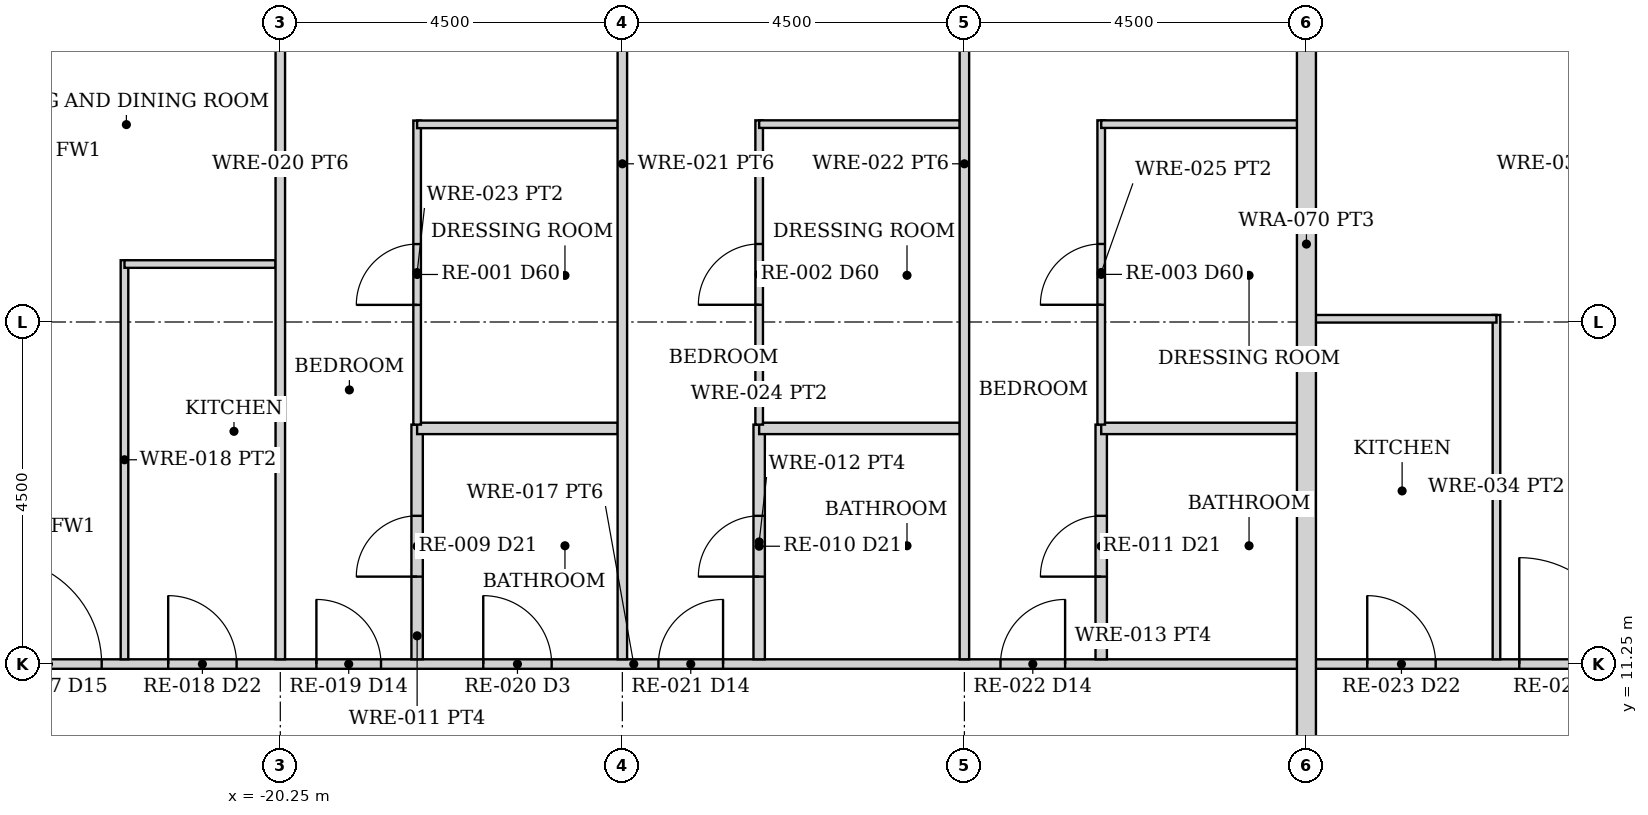
"""IFC4 building model, lengths in metres.
Left out: names, types, materials, properties, quantities, classifications, styles, units other than length and angle.
Written with IfcOpenShell. Run it as: python <this file> out.ifc"""

import sys

from ifc_helpers import new_model, si_unit, direction, frame, frame_2d, origin, place, context, subcontext, project, spatial, rectangle, extrude, element, fill, save


model = new_model("IFC4")
c1 = context("Model", 3, precision=1e-05, world=origin(), true_north=direction((0.0, 1.0)))
c2 = subcontext(c1, "Body", "Model", "MODEL_VIEW")
j1 = project(units=[si_unit("LENGTHUNIT", "METRE"), si_unit("PLANEANGLEUNIT", "RADIAN")], contexts=[c1])
p1 = place(None, origin())
s1 = spatial("IfcSite", under=j1, at=p1, CompositionType="ELEMENT")
p2 = place(p1, origin())
s2 = spatial("IfcBuilding", under=s1, at=p2, CompositionType="ELEMENT")
p3 = place(p2, frame((0.0, 0.0, 68.5)))
s3 = spatial("IfcBuildingStorey", under=s2, at=p3, CompositionType="ELEMENT", Elevation=68.5)
p4 = place(p3, frame((-24.35, 11.25, 0.0), z_axis=(0.0, 0.0, 1.0), x_axis=(1.0, 0.0, 0.0)))
e1 = element("IfcWall", 1, at=p4, inside=s3, PredefinedType="PARTITIONING", context=c2, shape_type="SweptSolid", body=[
    extrude(rectangle(XDim=17.5, YDim=0.125, at=frame_2d((8.75, 0.0))), origin(), (0.0, 0.0, 1.0), 2.373),
])
p5 = place(p4, frame((2.625, 0.0, 0.0)))
e2 = element("IfcOpeningElement", 2, at=p5, cuts=e1, PredefinedType="OPENING", context=c2, shape_type="SweptSolid", body=[
    extrude(rectangle(XDim=0.9, YDim=2.1, at=frame_2d((0.45, 1.05))), frame((0.0, 0.073, 0.0), z_axis=(0.0, -1.0, 0.0), x_axis=(1.0, 0.0, 0.0)), (0.0, 0.0, 1.0), 0.145),
])
p6 = place(p4, frame((0.35, 0.0, 0.0)))
e3 = element("IfcOpeningElement", 3, at=p6, cuts=e1, PredefinedType="OPENING", context=c2, shape_type="SweptSolid", body=[
    extrude(rectangle(XDim=1.4, YDim=2.1, at=frame_2d((0.7, 1.05))), frame((0.0, 0.073, 0.0), z_axis=(0.0, -1.0, 0.0), x_axis=(1.0, 0.0, 0.0)), (0.0, 0.0, 1.0), 0.145),
])
p7 = place(p4, frame((4.575, 0.0, 0.0)))
e4 = element("IfcOpeningElement", 4, at=p7, cuts=e1, PredefinedType="OPENING", context=c2, shape_type="SweptSolid", body=[
    extrude(rectangle(XDim=0.85, YDim=2.1, at=frame_2d((0.425, 1.05))), frame((0.0, 0.073, 0.0), z_axis=(0.0, -1.0, 0.0), x_axis=(1.0, 0.0, 0.0)), (0.0, 0.0, 1.0), 0.145),
])
p8 = place(p4, frame((6.77, 0.0, 0.0)))
e5 = element("IfcOpeningElement", 5, at=p8, cuts=e1, PredefinedType="OPENING", context=c2, shape_type="SweptSolid", body=[
    extrude(rectangle(XDim=0.9, YDim=2.1, at=frame_2d((0.45, 1.05))), frame((0.0, 0.073, 0.0), z_axis=(0.0, -1.0, 0.0), x_axis=(1.0, 0.0, 0.0)), (0.0, 0.0, 1.0), 0.145),
])
p9 = place(p4, frame((9.075, 0.0, 0.0)))
e6 = element("IfcOpeningElement", 6, at=p9, cuts=e1, PredefinedType="OPENING", context=c2, shape_type="SweptSolid", body=[
    extrude(rectangle(XDim=0.85, YDim=2.1, at=frame_2d((0.425, 1.05))), frame((0.0, 0.073, 0.0), z_axis=(0.0, -1.0, 0.0), x_axis=(1.0, 0.0, 0.0)), (0.0, 0.0, 1.0), 0.145),
])
p10 = place(p4, frame((13.575, 0.0, 0.0)))
e7 = element("IfcOpeningElement", 7, at=p10, cuts=e1, PredefinedType="OPENING", context=c2, shape_type="SweptSolid", body=[
    extrude(rectangle(XDim=0.85, YDim=2.1, at=frame_2d((0.425, 1.05))), frame((0.0, 0.073, 0.0), z_axis=(0.0, -1.0, 0.0), x_axis=(1.0, 0.0, 0.0)), (0.0, 0.0, 1.0), 0.145),
])
p11 = place(p3, frame((-22.3, 11.312, 0.0), z_axis=(0.0, 0.0, 1.0), x_axis=(0.0, 1.0, 0.0)))
e8 = element("IfcWall", 8, at=p11, inside=s3, PredefinedType="PARTITIONING", context=c2, shape_type="SweptSolid", body=[
    extrude(rectangle(XDim=5.25, YDim=0.1, at=frame_2d((2.625, 0.0))), origin(), (0.0, 0.0, 1.0), 2.373),
])
p12 = place(p3, frame((-22.3, 16.512, 0.0), z_axis=(0.0, 0.0, 1.0), x_axis=(1.0, 0.0, 0.0)))
e9 = element("IfcWall", 9, at=p12, inside=s3, PredefinedType="PARTITIONING", context=c2, shape_type="SweptSolid", body=[
    extrude(rectangle(XDim=1.988, YDim=0.1, at=frame_2d((0.994, 0.0))), origin(), (0.0, 0.0, 1.0), 2.373),
])
p13 = place(p3, frame((-20.25, 11.312, 0.0), z_axis=(0.0, 0.0, 1.0), x_axis=(0.0, 1.0, 0.0)))
e10 = element("IfcWall", 10, at=p13, inside=s3, PredefinedType="PARTITIONING", context=c2, shape_type="SweptSolid", body=[
    extrude(rectangle(XDim=13.038, YDim=0.125, at=frame_2d((6.519, 0.0))), origin(), (0.0, 0.0, 1.0), 2.373),
])
p14 = place(p3, frame((-18.45, 11.312, 0.0), z_axis=(0.0, 0.0, 1.0), x_axis=(0.0, 1.0, 0.0)))
e11 = element("IfcWall", 11, at=p14, inside=s3, PredefinedType="PARTITIONING", context=c2, shape_type="SweptSolid", body=[
    extrude(rectangle(XDim=3.087, YDim=0.15, at=frame_2d((1.544, 0.0))), origin(), (0.0, 0.0, 1.0), 2.373),
])
p15 = place(p14, frame((1.087, 0.0, 0.0)))
e12 = element("IfcOpeningElement", 12, at=p15, cuts=e11, PredefinedType="OPENING", context=c2, shape_type="SweptSolid", body=[
    extrude(rectangle(XDim=0.8, YDim=2.1, at=frame_2d((0.4, 1.05))), frame((0.0, 0.085, 0.0), z_axis=(0.0, -1.0, 0.0), x_axis=(1.0, 0.0, 0.0)), (0.0, 0.0, 1.0), 0.17),
])
p16 = place(p3, frame((-18.45, 14.35, 0.0), z_axis=(0.0, 0.0, 1.0), x_axis=(1.0, 0.0, 0.0)))
e13 = element("IfcWall", 13, at=p16, inside=s3, PredefinedType="PARTITIONING", context=c2, shape_type="SweptSolid", body=[
    extrude(rectangle(XDim=2.64, YDim=0.15, at=frame_2d((1.32, 0.0))), origin(), (0.0, 0.0, 1.0), 2.373),
])
p17 = place(p3, frame((-18.45, 14.4, 0.0), z_axis=(0.0, 0.0, 1.0), x_axis=(0.0, 1.0, 0.0)))
e14 = element("IfcWall", 14, at=p17, inside=s3, PredefinedType="PARTITIONING", context=c2, shape_type="SweptSolid", body=[
    extrude(rectangle(XDim=4.0, YDim=0.1, at=frame_2d((2.0, 0.0))), origin(), (0.0, 0.0, 1.0), 2.373),
])
p18 = place(p17, frame((1.575, 0.0, 0.0)))
e15 = element("IfcOpeningElement", 15, at=p18, cuts=e14, PredefinedType="OPENING", context=c2, shape_type="SweptSolid", body=[
    extrude(rectangle(XDim=0.8, YDim=2.1, at=frame_2d((0.4, 1.05))), frame((0.0, 0.06, 0.0), z_axis=(0.0, -1.0, 0.0), x_axis=(1.0, 0.0, 0.0)), (0.0, 0.0, 1.0), 0.12),
])
p19 = place(p3, frame((-18.45, 18.35, 0.0), z_axis=(0.0, 0.0, 1.0), x_axis=(1.0, 0.0, 0.0)))
e16 = element("IfcWall", 16, at=p19, inside=s3, PredefinedType="PARTITIONING", context=c2, shape_type="SweptSolid", body=[
    extrude(rectangle(XDim=2.64, YDim=0.1, at=frame_2d((1.32, 0.0))), origin(), (0.0, 0.0, 1.0), 2.373),
])
p20 = place(p3, frame((-15.75, 11.312, 0.0), z_axis=(0.0, 0.0, 1.0), x_axis=(0.0, 1.0, 0.0)))
e17 = element("IfcWall", 17, at=p20, inside=s3, PredefinedType="PARTITIONING", context=c2, shape_type="SweptSolid", body=[
    extrude(rectangle(XDim=13.038, YDim=0.125, at=frame_2d((6.519, 0.0))), origin(), (0.0, 0.0, 1.0), 2.373),
])
p21 = place(p3, frame((-13.95, 11.312, 0.0), z_axis=(0.0, 0.0, 1.0), x_axis=(0.0, 1.0, 0.0)))
e18 = element("IfcWall", 18, at=p21, inside=s3, PredefinedType="PARTITIONING", context=c2, shape_type="SweptSolid", body=[
    extrude(rectangle(XDim=3.087, YDim=0.15, at=frame_2d((1.544, 0.0))), origin(), (0.0, 0.0, 1.0), 2.373),
])
p22 = place(p21, frame((1.087, 0.0, 0.0)))
e19 = element("IfcOpeningElement", 19, at=p22, cuts=e18, PredefinedType="OPENING", context=c2, shape_type="SweptSolid", body=[
    extrude(rectangle(XDim=0.8, YDim=2.1, at=frame_2d((0.4, 1.05))), frame((0.0, 0.085, 0.0), z_axis=(0.0, -1.0, 0.0), x_axis=(1.0, 0.0, 0.0)), (0.0, 0.0, 1.0), 0.17),
])
p23 = place(p3, frame((-13.95, 14.35, 0.0), z_axis=(0.0, 0.0, 1.0), x_axis=(1.0, 0.0, 0.0)))
e20 = element("IfcWall", 20, at=p23, inside=s3, PredefinedType="PARTITIONING", context=c2, shape_type="SweptSolid", body=[
    extrude(rectangle(XDim=2.64, YDim=0.15, at=frame_2d((1.32, 0.0))), origin(), (0.0, 0.0, 1.0), 2.373),
])
p24 = place(p3, frame((-13.95, 14.4, 0.0), z_axis=(0.0, 0.0, 1.0), x_axis=(0.0, 1.0, 0.0)))
e21 = element("IfcWall", 21, at=p24, inside=s3, PredefinedType="PARTITIONING", context=c2, shape_type="SweptSolid", body=[
    extrude(rectangle(XDim=4.003, YDim=0.1, at=frame_2d((2.001, 0.0))), origin(), (0.0, 0.0, 1.0), 2.373),
])
p25 = place(p24, frame((1.576, 0.0, 0.0)))
e22 = element("IfcOpeningElement", 22, at=p25, cuts=e21, PredefinedType="OPENING", context=c2, shape_type="SweptSolid", body=[
    extrude(rectangle(XDim=0.8, YDim=2.1, at=frame_2d((0.4, 1.05))), frame((0.0, 0.06, 0.0), z_axis=(0.0, -1.0, 0.0), x_axis=(1.0, 0.0, 0.0)), (0.0, 0.0, 1.0), 0.12),
])
p26 = place(p3, frame((-13.95, 18.353, 0.0), z_axis=(0.0, 0.0, 1.0), x_axis=(1.0, 0.0, 0.0)))
e23 = element("IfcWall", 23, at=p26, inside=s3, PredefinedType="PARTITIONING", context=c2, shape_type="SweptSolid", body=[
    extrude(rectangle(XDim=2.64, YDim=0.1, at=frame_2d((1.32, 0.0))), origin(), (0.0, 0.0, 1.0), 2.373),
])
p27 = place(p3, frame((-11.25, 11.312, 0.0), z_axis=(0.0, 0.0, 1.0), x_axis=(0.0, 1.0, 0.0)))
e24 = element("IfcWall", 24, at=p27, inside=s3, PredefinedType="PARTITIONING", context=c2, shape_type="SweptSolid", body=[
    extrude(rectangle(XDim=13.038, YDim=0.125, at=frame_2d((6.519, 0.0))), origin(), (0.0, 0.0, 1.0), 2.373),
])
p28 = place(p3, frame((-9.45, 11.312, 0.0), z_axis=(0.0, 0.0, 1.0), x_axis=(0.0, 1.0, 0.0)))
e25 = element("IfcWall", 25, at=p28, inside=s3, PredefinedType="PARTITIONING", context=c2, shape_type="SweptSolid", body=[
    extrude(rectangle(XDim=3.087, YDim=0.15, at=frame_2d((1.544, 0.0))), origin(), (0.0, 0.0, 1.0), 2.373),
])
p29 = place(p28, frame((1.087, 0.0, 0.0)))
e26 = element("IfcOpeningElement", 26, at=p29, cuts=e25, PredefinedType="OPENING", context=c2, shape_type="SweptSolid", body=[
    extrude(rectangle(XDim=0.8, YDim=2.1, at=frame_2d((0.4, 1.05))), frame((0.0, 0.085, 0.0), z_axis=(0.0, -1.0, 0.0), x_axis=(1.0, 0.0, 0.0)), (0.0, 0.0, 1.0), 0.17),
])
p30 = place(p3, frame((-9.45, 14.35, 0.0), z_axis=(0.0, 0.0, 1.0), x_axis=(1.0, 0.0, 0.0)))
e27 = element("IfcWall", 27, at=p30, inside=s3, PredefinedType="PARTITIONING", context=c2, shape_type="SweptSolid", body=[
    extrude(rectangle(XDim=2.64, YDim=0.15, at=frame_2d((1.32, 0.0))), origin(), (0.0, 0.0, 1.0), 2.373),
])
p31 = place(p3, frame((-9.45, 14.4, 0.0), z_axis=(0.0, 0.0, 1.0), x_axis=(0.0, 1.0, 0.0)))
e28 = element("IfcWall", 28, at=p31, inside=s3, PredefinedType="PARTITIONING", context=c2, shape_type="SweptSolid", body=[
    extrude(rectangle(XDim=4.003, YDim=0.1, at=frame_2d((2.001, 0.0))), origin(), (0.0, 0.0, 1.0), 2.373),
])
p32 = place(p31, frame((1.576, 0.0, 0.0)))
e29 = element("IfcOpeningElement", 29, at=p32, cuts=e28, PredefinedType="OPENING", context=c2, shape_type="SweptSolid", body=[
    extrude(rectangle(XDim=0.8, YDim=2.1, at=frame_2d((0.4, 1.05))), frame((0.0, 0.06, 0.0), z_axis=(0.0, -1.0, 0.0), x_axis=(1.0, 0.0, 0.0)), (0.0, 0.0, 1.0), 0.12),
])
p33 = place(p3, frame((-9.45, 18.353, 0.0), z_axis=(0.0, 0.0, 1.0), x_axis=(1.0, 0.0, 0.0)))
e30 = element("IfcWall", 30, at=p33, inside=s3, PredefinedType="PARTITIONING", context=c2, shape_type="SweptSolid", body=[
    extrude(rectangle(XDim=2.64, YDim=0.1, at=frame_2d((1.32, 0.0))), origin(), (0.0, 0.0, 1.0), 2.373),
])
p34 = place(p3, frame((-6.65, 11.25, 0.0), z_axis=(0.0, 0.0, 1.0), x_axis=(1.0, 0.0, 0.0)))
e31 = element("IfcWall", 31, at=p34, inside=s3, PredefinedType="PARTITIONING", context=c2, shape_type="SweptSolid", body=[
    extrude(rectangle(XDim=13.3, YDim=0.125, at=frame_2d((6.65, 0.0))), origin(), (0.0, 0.0, 1.0), 2.373),
])
p35 = place(p34, frame((0.7, 0.0, 0.0)))
e32 = element("IfcOpeningElement", 32, at=p35, cuts=e31, PredefinedType="OPENING", context=c2, shape_type="SweptSolid", body=[
    extrude(rectangle(XDim=0.9, YDim=2.1, at=frame_2d((0.45, 1.05))), frame((0.0, 0.073, 0.0), z_axis=(0.0, -1.0, 0.0), x_axis=(1.0, 0.0, 0.0)), (0.0, 0.0, 1.0), 0.145),
])
p36 = place(p34, frame((2.7, 0.0, 0.0)))
e33 = element("IfcOpeningElement", 33, at=p36, cuts=e31, PredefinedType="OPENING", context=c2, shape_type="SweptSolid", body=[
    extrude(rectangle(XDim=1.4, YDim=2.1, at=frame_2d((0.7, 1.05))), frame((0.0, 0.073, 0.0), z_axis=(0.0, -1.0, 0.0), x_axis=(1.0, 0.0, 0.0)), (0.0, 0.0, 1.0), 0.145),
])
p37 = place(p34, frame((4.875, 0.0, 0.0)))
e34 = element("IfcOpeningElement", 34, at=p37, cuts=e31, PredefinedType="OPENING", context=c2, shape_type="SweptSolid", body=[
    extrude(rectangle(XDim=0.85, YDim=2.1, at=frame_2d((0.425, 1.05))), frame((0.0, 0.073, 0.0), z_axis=(0.0, -1.0, 0.0), x_axis=(1.0, 0.0, 0.0)), (0.0, 0.0, 1.0), 0.145),
])
p38 = place(p34, frame((7.07, 0.0, 0.0)))
e35 = element("IfcOpeningElement", 35, at=p38, cuts=e31, PredefinedType="OPENING", context=c2, shape_type="SweptSolid", body=[
    extrude(rectangle(XDim=0.9, YDim=2.1, at=frame_2d((0.45, 1.05))), frame((0.0, 0.073, 0.0), z_axis=(0.0, -1.0, 0.0), x_axis=(1.0, 0.0, 0.0)), (0.0, 0.0, 1.0), 0.145),
])
p39 = place(p34, frame((9.375, 0.0, 0.0)))
e36 = element("IfcOpeningElement", 36, at=p39, cuts=e31, PredefinedType="OPENING", context=c2, shape_type="SweptSolid", body=[
    extrude(rectangle(XDim=0.85, YDim=2.1, at=frame_2d((0.425, 1.05))), frame((0.0, 0.073, 0.0), z_axis=(0.0, -1.0, 0.0), x_axis=(1.0, 0.0, 0.0)), (0.0, 0.0, 1.0), 0.145),
])
p40 = place(p3, frame((-4.25, 11.312, 0.0), z_axis=(0.0, 0.0, 1.0), x_axis=(0.0, 1.0, 0.0)))
e37 = element("IfcWall", 37, at=p40, inside=s3, PredefinedType="PARTITIONING", context=c2, shape_type="SweptSolid", body=[
    extrude(rectangle(XDim=4.53, YDim=0.1, at=frame_2d((2.265, 0.0))), origin(), (0.0, 0.0, 1.0), 2.373),
])
p41 = place(p3, frame((-6.683, 15.792, 0.0), z_axis=(0.0, 0.0, 1.0), x_axis=(1.0, 0.0, 0.0)))
e38 = element("IfcWall", 38, at=p41, inside=s3, PredefinedType="PARTITIONING", context=c2, shape_type="SweptSolid", body=[
    extrude(rectangle(XDim=2.433, YDim=0.1, at=frame_2d((1.216, 0.0))), origin(), (0.0, 0.0, 1.0), 2.373),
])
p42 = place(p3, frame((-6.75, 9.2, 0.0), z_axis=(0.0, 0.0, 1.0), x_axis=(0.0, 1.0, 0.0)))
e39 = element("IfcWall", 39, at=p42, inside=s3, PredefinedType="PARTITIONING", context=c2, shape_type="SweptSolid", body=[
    extrude(rectangle(XDim=15.15, YDim=0.25, at=frame_2d((7.575, 0.0))), origin(), (0.0, 0.0, 1.0), 2.373),
])
p43 = place(p5, origin())
e40 = element("IfcDoor", 40, at=p43, inside=s3, OperationType="SINGLE_SWING_LEFT", PredefinedType="DOOR", context=c2, shape_type="SweptSolid", body=[
    extrude(rectangle(XDim=0.9, YDim=2.1, at=frame_2d((0.45, 1.05))), frame((0.0, 0.025, 0.0), z_axis=(0.0, -1.0, 0.0), x_axis=(1.0, 0.0, 0.0)), (0.0, 0.0, 1.0), 0.05),
])
fill(e2, e40)
p44 = place(p6, origin())
e41 = element("IfcDoor", 41, at=p44, inside=s3, OperationType="SINGLE_SWING_LEFT", PredefinedType="DOOR", context=c2, shape_type="SweptSolid", body=[
    extrude(rectangle(XDim=1.4, YDim=2.1, at=frame_2d((0.7, 1.05))), frame((0.0, 0.025, 0.0), z_axis=(0.0, -1.0, 0.0), x_axis=(1.0, 0.0, 0.0)), (0.0, 0.0, 1.0), 0.05),
])
fill(e3, e41)
p45 = place(p7, origin())
e42 = element("IfcDoor", 42, at=p45, inside=s3, OperationType="SINGLE_SWING_LEFT", PredefinedType="DOOR", context=c2, shape_type="SweptSolid", body=[
    extrude(rectangle(XDim=0.85, YDim=2.1, at=frame_2d((0.425, 1.05))), frame((0.0, 0.025, 0.0), z_axis=(0.0, -1.0, 0.0), x_axis=(1.0, 0.0, 0.0)), (0.0, 0.0, 1.0), 0.05),
])
fill(e4, e42)
p46 = place(p15, origin())
e43 = element("IfcDoor", 43, at=p46, inside=s3, OperationType="SINGLE_SWING_LEFT", PredefinedType="DOOR", context=c2, shape_type="SweptSolid", body=[
    extrude(rectangle(XDim=0.8, YDim=2.1, at=frame_2d((0.4, 1.05))), frame((0.0, 0.025, 0.0), z_axis=(0.0, -1.0, 0.0), x_axis=(1.0, 0.0, 0.0)), (0.0, 0.0, 1.0), 0.05),
])
fill(e12, e43)
p47 = place(p8, origin())
e44 = element("IfcDoor", 44, at=p47, inside=s3, OperationType="SINGLE_SWING_LEFT", PredefinedType="DOOR", context=c2, shape_type="SweptSolid", body=[
    extrude(rectangle(XDim=0.9, YDim=2.1, at=frame_2d((0.45, 1.05))), frame((0.0, 0.025, 0.0), z_axis=(0.0, -1.0, 0.0), x_axis=(1.0, 0.0, 0.0)), (0.0, 0.0, 1.0), 0.05),
])
fill(e5, e44)
p48 = place(p18, origin())
e45 = element("IfcDoor", 45, at=p48, inside=s3, OperationType="SINGLE_SWING_LEFT", PredefinedType="DOOR", context=c2, shape_type="SweptSolid", body=[
    extrude(rectangle(XDim=0.8, YDim=2.1, at=frame_2d((0.4, 1.05))), frame((0.0, 0.025, 0.0), z_axis=(0.0, -1.0, 0.0), x_axis=(1.0, 0.0, 0.0)), (0.0, 0.0, 1.0), 0.05),
])
fill(e15, e45)
p49 = place(p9, origin())
e46 = element("IfcDoor", 46, at=p49, inside=s3, OperationType="SINGLE_SWING_RIGHT", PredefinedType="DOOR", context=c2, shape_type="SweptSolid", body=[
    extrude(rectangle(XDim=0.85, YDim=2.1, at=frame_2d((0.425, 1.05))), frame((0.0, 0.025, 0.0), z_axis=(0.0, -1.0, 0.0), x_axis=(1.0, 0.0, 0.0)), (0.0, 0.0, 1.0), 0.05),
])
fill(e6, e46)
p50 = place(p22, origin())
e47 = element("IfcDoor", 47, at=p50, inside=s3, OperationType="SINGLE_SWING_LEFT", PredefinedType="DOOR", context=c2, shape_type="SweptSolid", body=[
    extrude(rectangle(XDim=0.8, YDim=2.1, at=frame_2d((0.4, 1.05))), frame((0.0, 0.025, 0.0), z_axis=(0.0, -1.0, 0.0), x_axis=(1.0, 0.0, 0.0)), (0.0, 0.0, 1.0), 0.05),
])
fill(e19, e47)
p51 = place(p25, origin())
e48 = element("IfcDoor", 48, at=p51, inside=s3, OperationType="SINGLE_SWING_LEFT", PredefinedType="DOOR", context=c2, shape_type="SweptSolid", body=[
    extrude(rectangle(XDim=0.8, YDim=2.1, at=frame_2d((0.4, 1.05))), frame((0.0, 0.025, 0.0), z_axis=(0.0, -1.0, 0.0), x_axis=(1.0, 0.0, 0.0)), (0.0, 0.0, 1.0), 0.05),
])
fill(e22, e48)
p52 = place(p10, origin())
e49 = element("IfcDoor", 49, at=p52, inside=s3, OperationType="SINGLE_SWING_RIGHT", PredefinedType="DOOR", context=c2, shape_type="SweptSolid", body=[
    extrude(rectangle(XDim=0.85, YDim=2.1, at=frame_2d((0.425, 1.05))), frame((0.0, 0.025, 0.0), z_axis=(0.0, -1.0, 0.0), x_axis=(1.0, 0.0, 0.0)), (0.0, 0.0, 1.0), 0.05),
])
fill(e7, e49)
p53 = place(p29, origin())
e50 = element("IfcDoor", 50, at=p53, inside=s3, OperationType="SINGLE_SWING_LEFT", PredefinedType="DOOR", context=c2, shape_type="SweptSolid", body=[
    extrude(rectangle(XDim=0.8, YDim=2.1, at=frame_2d((0.4, 1.05))), frame((0.0, 0.025, 0.0), z_axis=(0.0, -1.0, 0.0), x_axis=(1.0, 0.0, 0.0)), (0.0, 0.0, 1.0), 0.05),
])
fill(e26, e50)
p54 = place(p32, origin())
e51 = element("IfcDoor", 51, at=p54, inside=s3, OperationType="SINGLE_SWING_LEFT", PredefinedType="DOOR", context=c2, shape_type="SweptSolid", body=[
    extrude(rectangle(XDim=0.8, YDim=2.1, at=frame_2d((0.4, 1.05))), frame((0.0, 0.025, 0.0), z_axis=(0.0, -1.0, 0.0), x_axis=(1.0, 0.0, 0.0)), (0.0, 0.0, 1.0), 0.05),
])
fill(e29, e51)
p55 = place(p35, origin())
e52 = element("IfcDoor", 52, at=p55, inside=s3, OperationType="SINGLE_SWING_LEFT", PredefinedType="DOOR", context=c2, shape_type="SweptSolid", body=[
    extrude(rectangle(XDim=0.9, YDim=2.1, at=frame_2d((0.45, 1.05))), frame((0.0, 0.025, 0.0), z_axis=(0.0, -1.0, 0.0), x_axis=(1.0, 0.0, 0.0)), (0.0, 0.0, 1.0), 0.05),
])
fill(e32, e52)
p56 = place(p36, origin())
e53 = element("IfcDoor", 53, at=p56, inside=s3, OperationType="SINGLE_SWING_LEFT", PredefinedType="DOOR", context=c2, shape_type="SweptSolid", body=[
    extrude(rectangle(XDim=1.4, YDim=2.1, at=frame_2d((0.7, 1.05))), frame((0.0, 0.025, 0.0), z_axis=(0.0, -1.0, 0.0), x_axis=(1.0, 0.0, 0.0)), (0.0, 0.0, 1.0), 0.05),
])
fill(e33, e53)
save(model, sys.argv[1])
